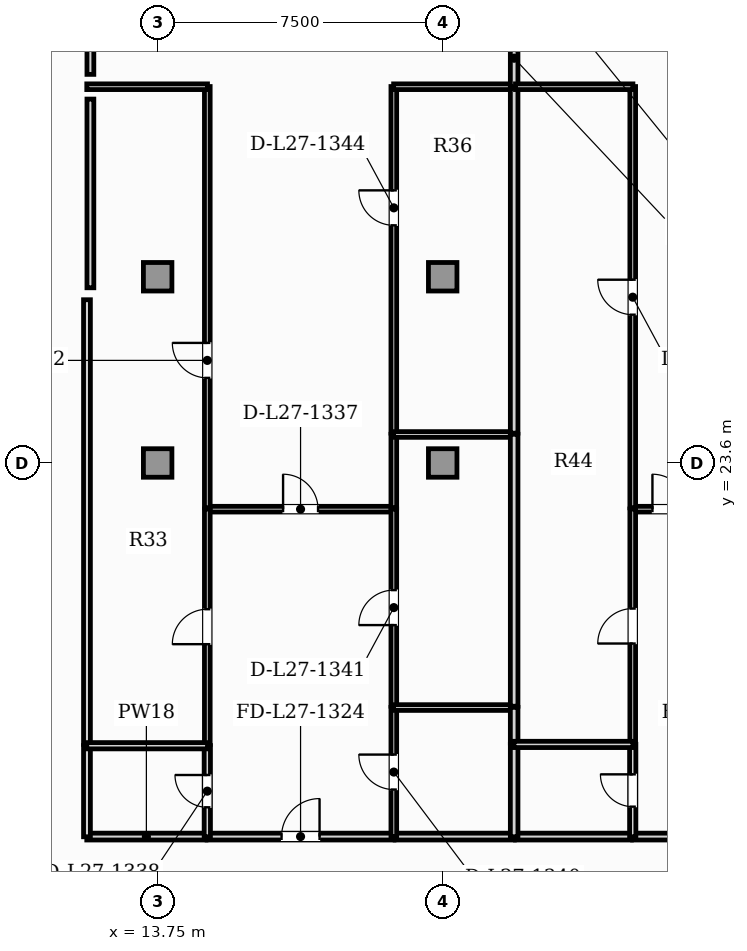
"""IFC4 building model, lengths in metres.
Left out: names, types, materials, properties, quantities, classifications, styles, units other than length and angle.
Written with IfcOpenShell. Run it as: python <this file> out.ifc"""

import sys

from ifc_helpers import new_model, si_unit, direction, frame, frame_2d, origin, origin_2d, place, context, subcontext, project, spatial, rectangle, extrude, element, fill, save


model = new_model("IFC4")
c1 = context("Model", 3, precision=1e-05, world=origin(), true_north=direction((0.0, 1.0)))
c2 = subcontext(c1, "Body", "Model", "MODEL_VIEW")
j1 = project(units=[si_unit("LENGTHUNIT", "METRE"), si_unit("PLANEANGLEUNIT", "RADIAN")], contexts=[c1])
p1 = place(None, origin())
s1 = spatial("IfcSite", under=j1, at=p1, CompositionType="ELEMENT")
p2 = place(p1, origin())
s2 = spatial("IfcBuilding", under=s1, at=p2, CompositionType="ELEMENT")
p3 = place(p2, frame((0.0, 0.0, 111.85)))
s3 = spatial("IfcBuildingStorey", under=s2, at=p3, CompositionType="ELEMENT", Elevation=111.85)
for number, where, z_axis, x_axis in (
    (1, (13.75, 23.6, 0.0), (0.0, 0.0, 1.0), (1.0, 0.0, 0.0)),
    (2, (21.25, 23.6, 0.0), (0.0, 0.0, 1.0), (1.0, 0.0, 0.0)),
    (3, (13.75, 28.5, 0.0), (0.0, 0.0, 1.0), (1.0, 0.0, 0.0)),
    (4, (21.25, 28.5, 0.0), (0.0, 0.0, 1.0), (1.0, 0.0, 0.0)),
):
    element("IfcColumn", number, at=place(p3, frame(where, z_axis=z_axis, x_axis=x_axis)), inside=s3, PredefinedType="COLUMN", context=c2, shape_type="SweptSolid", body=[
        extrude(rectangle(XDim=0.75, YDim=0.75, at=origin_2d()), origin(), (0.0, 0.0, 1.0), 3.85),
    ])
p4 = place(p3, frame((15.051, 13.77, 0.0), z_axis=(0.0, 0.0, 1.0), x_axis=(1.0, 0.0, 0.0)))
e5 = element("IfcWall", 5, at=p4, inside=s3, PredefinedType="PARTITIONING", context=c2, shape_type="SweptSolid", body=[
    extrude(rectangle(XDim=4.917, YDim=0.18, at=frame_2d((2.459, 0.0))), origin(), (0.0, 0.0, 1.0), 3.6),
])
p5 = place(p4, frame((1.959, 0.0, 0.0)))
e6 = element("IfcOpeningElement", 6, at=p5, cuts=e5, PredefinedType="OPENING", context=c2, shape_type="SweptSolid", body=[
    extrude(rectangle(XDim=1.0, YDim=2.15, at=frame_2d((0.5, 1.075))), frame((0.0, 0.1, 0.0), z_axis=(0.0, -1.0, 0.0), x_axis=(1.0, 0.0, 0.0)), (0.0, 0.0, 1.0), 0.2),
])
p6 = place(p3, frame((11.885, 13.77, 0.0), z_axis=(0.0, 0.0, 1.0), x_axis=(1.0, 0.0, 0.0)))
e7 = element("IfcWall", 7, at=p6, inside=s3, PredefinedType="PARTITIONING", context=c2, shape_type="SweptSolid", body=[
    extrude(rectangle(XDim=3.136, YDim=0.18, at=frame_2d((1.568, 0.0))), origin(), (0.0, 0.0, 1.0), 3.6),
])
p7 = place(p3, frame((11.89, 13.765, 0.0), z_axis=(0.0, 0.0, 1.0), x_axis=(0.0, 1.0, 0.0)))
e8 = element("IfcWall", 8, at=p7, inside=s3, PredefinedType="PARTITIONING", context=c2, shape_type="SweptSolid", body=[
    extrude(rectangle(XDim=2.4, YDim=0.18, at=frame_2d((1.2, 0.0))), origin(), (0.0, 0.0, 1.0), 3.6),
])
p8 = place(p3, frame((11.89, 16.195, 0.0), z_axis=(0.0, 0.0, 1.0), x_axis=(0.0, 1.0, 0.0)))
e9 = element("IfcWall", 9, at=p8, inside=s3, PredefinedType="PARTITIONING", context=c2, shape_type="SweptSolid", body=[
    extrude(rectangle(XDim=11.7, YDim=0.18, at=frame_2d((5.85, 0.0))), origin(), (0.0, 0.0, 1.0), 3.6),
])
p9 = place(p3, frame((19.999, 13.77, 0.0), z_axis=(0.0, 0.0, 1.0), x_axis=(1.0, 0.0, 0.0)))
e10 = element("IfcWall", 10, at=p9, inside=s3, PredefinedType="PARTITIONING", context=c2, shape_type="SweptSolid", body=[
    extrude(rectangle(XDim=3.136, YDim=0.18, at=frame_2d((1.568, 0.0))), origin(), (0.0, 0.0, 1.0), 3.6),
])
p10 = place(p3, frame((26.245, 13.77, 0.0), z_axis=(0.0, 0.0, 1.0), x_axis=(1.0, 0.0, 0.0)))
e11 = element("IfcWall", 11, at=p10, inside=s3, PredefinedType="PARTITIONING", context=c2, shape_type="SweptSolid", body=[
    extrude(rectangle(XDim=4.918, YDim=0.18, at=frame_2d((2.459, 0.0))), origin(), (0.0, 0.0, 1.0), 3.6),
])
p11 = place(p10, frame((1.959, 0.0, 0.0)))
e12 = element("IfcOpeningElement", 12, at=p11, cuts=e11, PredefinedType="OPENING", context=c2, shape_type="SweptSolid", body=[
    extrude(rectangle(XDim=1.0, YDim=2.15, at=frame_2d((0.5, 1.075))), frame((0.0, 0.1, 0.0), z_axis=(0.0, -1.0, 0.0), x_axis=(1.0, 0.0, 0.0)), (0.0, 0.0, 1.0), 0.2),
])
p12 = place(p3, frame((23.165, 13.77, 0.0), z_axis=(0.0, 0.0, 1.0), x_axis=(1.0, 0.0, 0.0)))
e13 = element("IfcWall", 13, at=p12, inside=s3, PredefinedType="PARTITIONING", context=c2, shape_type="SweptSolid", body=[
    extrude(rectangle(XDim=3.05, YDim=0.18, at=frame_2d((1.525, 0.0))), origin(), (0.0, 0.0, 1.0), 3.6),
])
p13 = place(p3, frame((15.051, 22.385, 0.0), z_axis=(0.0, 0.0, 1.0), x_axis=(1.0, 0.0, 0.0)))
e14 = element("IfcWall", 14, at=p13, inside=s3, PredefinedType="PARTITIONING", context=c2, shape_type="SweptSolid", body=[
    extrude(rectangle(XDim=4.917, YDim=0.15, at=frame_2d((2.459, 0.0))), origin(), (0.0, 0.0, 1.0), 3.6),
])
p14 = place(p13, frame((1.999, 0.0, 0.0)))
e15 = element("IfcOpeningElement", 15, at=p14, cuts=e14, PredefinedType="OPENING", context=c2, shape_type="SweptSolid", body=[
    extrude(rectangle(XDim=0.92, YDim=2.1, at=frame_2d((0.46, 1.05))), frame((0.0, 0.085, 0.0), z_axis=(0.0, -1.0, 0.0), x_axis=(1.0, 0.0, 0.0)), (0.0, 0.0, 1.0), 0.17),
])
p15 = place(p3, frame((15.056, 13.765, 0.0), z_axis=(0.0, 0.0, 1.0), x_axis=(0.0, 1.0, 0.0)))
e16 = element("IfcWall", 16, at=p15, inside=s3, PredefinedType="PLUMBINGWALL", context=c2, shape_type="SweptSolid", body=[
    extrude(rectangle(XDim=2.4, YDim=0.165, at=frame_2d((1.2, 0.0))), origin(), (0.0, 0.0, 1.0), 3.6),
])
p16 = place(p15, frame((0.775, 0.0, 0.0)))
e17 = element("IfcOpeningElement", 17, at=p16, cuts=e16, PredefinedType="OPENING", context=c2, shape_type="SweptSolid", body=[
    extrude(rectangle(XDim=0.85, YDim=2.1, at=frame_2d((0.425, 1.05))), frame((0.0, 0.093, 0.0), z_axis=(0.0, -1.0, 0.0), x_axis=(1.0, 0.0, 0.0)), (0.0, 0.0, 1.0), 0.185),
])
p17 = place(p3, frame((15.056, 16.195, 0.0), z_axis=(0.0, 0.0, 1.0), x_axis=(0.0, 1.0, 0.0)))
e18 = element("IfcWall", 18, at=p17, inside=s3, PredefinedType="PARTITIONING", context=c2, shape_type="SweptSolid", body=[
    extrude(rectangle(XDim=6.194, YDim=0.15, at=frame_2d((3.097, 0.0))), origin(), (0.0, 0.0, 1.0), 3.6),
])
p18 = place(p17, frame((2.637, 0.0, 0.0)))
e19 = element("IfcOpeningElement", 19, at=p18, cuts=e18, PredefinedType="OPENING", context=c2, shape_type="SweptSolid", body=[
    extrude(rectangle(XDim=0.92, YDim=2.1, at=frame_2d((0.46, 1.05))), frame((0.0, 0.085, 0.0), z_axis=(0.0, -1.0, 0.0), x_axis=(1.0, 0.0, 0.0)), (0.0, 0.0, 1.0), 0.17),
])
p19 = place(p3, frame((19.964, 13.765, 0.0), z_axis=(0.0, 0.0, 1.0), x_axis=(0.0, 1.0, 0.0)))
e20 = element("IfcWall", 20, at=p19, inside=s3, PredefinedType="PARTITIONING", context=c2, shape_type="SweptSolid", body=[
    extrude(rectangle(XDim=3.405, YDim=0.15, at=frame_2d((1.703, 0.0))), origin(), (0.0, 0.0, 1.0), 3.6),
])
p20 = place(p19, frame((1.242, 0.0, 0.0)))
e21 = element("IfcOpeningElement", 21, at=p20, cuts=e20, PredefinedType="OPENING", context=c2, shape_type="SweptSolid", body=[
    extrude(rectangle(XDim=0.92, YDim=2.1, at=frame_2d((0.46, 1.05))), frame((0.0, 0.085, 0.0), z_axis=(0.0, -1.0, 0.0), x_axis=(1.0, 0.0, 0.0)), (0.0, 0.0, 1.0), 0.17),
])
p21 = place(p3, frame((19.964, 17.2, 0.0), z_axis=(0.0, 0.0, 1.0), x_axis=(0.0, 1.0, 0.0)))
e22 = element("IfcWall", 22, at=p21, inside=s3, PredefinedType="PARTITIONING", context=c2, shape_type="SweptSolid", body=[
    extrude(rectangle(XDim=5.19, YDim=0.15, at=frame_2d((2.595, 0.0))), origin(), (0.0, 0.0, 1.0), 3.6),
])
p22 = place(p21, frame((2.135, 0.0, 0.0)))
e23 = element("IfcOpeningElement", 23, at=p22, cuts=e22, PredefinedType="OPENING", context=c2, shape_type="SweptSolid", body=[
    extrude(rectangle(XDim=0.92, YDim=2.1, at=frame_2d((0.46, 1.05))), frame((0.0, 0.085, 0.0), z_axis=(0.0, -1.0, 0.0), x_axis=(1.0, 0.0, 0.0)), (0.0, 0.0, 1.0), 0.17),
])
p23 = place(p3, frame((15.056, 22.419, 0.0), z_axis=(0.0, 0.0, 1.0), x_axis=(0.0, 1.0, 0.0)))
e24 = element("IfcWall", 24, at=p23, inside=s3, PredefinedType="PARTITIONING", context=c2, shape_type="SweptSolid", body=[
    extrude(rectangle(XDim=11.085, YDim=0.15, at=frame_2d((5.543, 0.0))), origin(), (0.0, 0.0, 1.0), 3.6),
])
p24 = place(p23, frame((3.42, 0.0, 0.0)))
e25 = element("IfcOpeningElement", 25, at=p24, cuts=e24, PredefinedType="OPENING", context=c2, shape_type="SweptSolid", body=[
    extrude(rectangle(XDim=0.92, YDim=2.1, at=frame_2d((0.46, 1.05))), frame((0.0, 0.085, 0.0), z_axis=(0.0, -1.0, 0.0), x_axis=(1.0, 0.0, 0.0)), (0.0, 0.0, 1.0), 0.17),
])
p25 = place(p3, frame((11.885, 33.5, 0.0), z_axis=(0.0, 0.0, 1.0), x_axis=(1.0, 0.0, 0.0)))
e26 = element("IfcWall", 26, at=p25, inside=s3, PredefinedType="PARTITIONING", context=c2, shape_type="SweptSolid", body=[
    extrude(rectangle(XDim=3.176, YDim=0.15, at=frame_2d((1.588, 0.0))), origin(), (0.0, 0.0, 1.0), 3.6),
])
p26 = place(p3, frame((19.964, 22.419, 0.0), z_axis=(0.0, 0.0, 1.0), x_axis=(0.0, 1.0, 0.0)))
e27 = element("IfcWall", 27, at=p26, inside=s3, PredefinedType="PARTITIONING", context=c2, shape_type="SweptSolid", body=[
    extrude(rectangle(XDim=1.936, YDim=0.15, at=frame_2d((0.968, 0.0))), origin(), (0.0, 0.0, 1.0), 3.6),
])
p27 = place(p3, frame((19.964, 24.385, 0.0), z_axis=(0.0, 0.0, 1.0), x_axis=(0.0, 1.0, 0.0)))
e28 = element("IfcWall", 28, at=p27, inside=s3, PredefinedType="PARTITIONING", context=c2, shape_type="SweptSolid", body=[
    extrude(rectangle(XDim=9.12, YDim=0.15, at=frame_2d((4.56, 0.0))), origin(), (0.0, 0.0, 1.0), 3.6),
])
p28 = place(p27, frame((5.468, 0.0, 0.0)))
e29 = element("IfcOpeningElement", 29, at=p28, cuts=e28, PredefinedType="OPENING", context=c2, shape_type="SweptSolid", body=[
    extrude(rectangle(XDim=0.92, YDim=2.1, at=frame_2d((0.46, 1.05))), frame((0.0, 0.085, 0.0), z_axis=(0.0, -1.0, 0.0), x_axis=(1.0, 0.0, 0.0)), (0.0, 0.0, 1.0), 0.17),
])
p29 = place(p3, frame((19.959, 33.5, 0.0), z_axis=(0.0, 0.0, 1.0), x_axis=(1.0, 0.0, 0.0)))
e30 = element("IfcWall", 30, at=p29, inside=s3, PredefinedType="PARTITIONING", context=c2, shape_type="SweptSolid", body=[
    extrude(rectangle(XDim=3.176, YDim=0.15, at=frame_2d((1.588, 0.0))), origin(), (0.0, 0.0, 1.0), 3.6),
])
p30 = place(p3, frame((23.13, 33.495, 0.0), z_axis=(0.0, 0.0, 1.0), x_axis=(0.0, 1.0, 0.0)))
e31 = element("IfcWall", 31, at=p30, inside=s3, PredefinedType="PARTITIONING", context=c2, shape_type="SweptSolid", body=[
    extrude(rectangle(XDim=1.51, YDim=0.2, at=frame_2d((0.755, 0.0))), origin(), (0.0, 0.0, 1.0), 3.6),
])
p31 = place(p3, frame((11.885, 16.16, 0.0), z_axis=(0.0, 0.0, 1.0), x_axis=(1.0, 0.0, 0.0)))
e32 = element("IfcWall", 32, at=p31, inside=s3, PredefinedType="PLUMBINGWALL", context=c2, shape_type="SweptSolid", body=[
    extrude(rectangle(XDim=3.176, YDim=0.165, at=frame_2d((1.588, 0.0))), origin(), (0.0, 0.0, 1.0), 3.6),
])
p32 = place(p3, frame((19.959, 17.165, 0.0), z_axis=(0.0, 0.0, 1.0), x_axis=(1.0, 0.0, 0.0)))
e33 = element("IfcWall", 33, at=p32, inside=s3, PredefinedType="PARTITIONING", context=c2, shape_type="SweptSolid", body=[
    extrude(rectangle(XDim=3.176, YDim=0.15, at=frame_2d((1.588, 0.0))), origin(), (0.0, 0.0, 1.0), 3.6),
])
p33 = place(p3, frame((23.13, 13.765, 0.0), z_axis=(0.0, 0.0, 1.0), x_axis=(0.0, 1.0, 0.0)))
e34 = element("IfcWall", 34, at=p33, inside=s3, PredefinedType="PARTITIONING", context=c2, shape_type="SweptSolid", body=[
    extrude(rectangle(XDim=2.435, YDim=0.2, at=frame_2d((1.217, 0.0))), origin(), (0.0, 0.0, 1.0), 3.6),
])
p34 = place(p3, frame((23.13, 16.23, 0.0), z_axis=(0.0, 0.0, 1.0), x_axis=(0.0, 1.0, 0.0)))
e35 = element("IfcWall", 35, at=p34, inside=s3, PredefinedType="PARTITIONING", context=c2, shape_type="SweptSolid", body=[
    extrude(rectangle(XDim=0.94, YDim=0.2, at=frame_2d((0.47, 0.0))), origin(), (0.0, 0.0, 1.0), 3.6),
])
p35 = place(p3, frame((19.959, 24.35, 0.0), z_axis=(0.0, 0.0, 1.0), x_axis=(1.0, 0.0, 0.0)))
e36 = element("IfcWall", 36, at=p35, inside=s3, PredefinedType="PARTITIONING", context=c2, shape_type="SweptSolid", body=[
    extrude(rectangle(XDim=3.176, YDim=0.15, at=frame_2d((1.588, 0.0))), origin(), (0.0, 0.0, 1.0), 3.6),
])
p36 = place(p3, frame((23.13, 17.2, 0.0), z_axis=(0.0, 0.0, 1.0), x_axis=(0.0, 1.0, 0.0)))
e37 = element("IfcWall", 37, at=p36, inside=s3, PredefinedType="PARTITIONING", context=c2, shape_type="SweptSolid", body=[
    extrude(rectangle(XDim=7.155, YDim=0.2, at=frame_2d((3.578, 0.0))), origin(), (0.0, 0.0, 1.0), 3.6),
])
p37 = place(p3, frame((23.13, 24.385, 0.0), z_axis=(0.0, 0.0, 1.0), x_axis=(0.0, 1.0, 0.0)))
e38 = element("IfcWall", 38, at=p37, inside=s3, PredefinedType="PARTITIONING", context=c2, shape_type="SweptSolid", body=[
    extrude(rectangle(XDim=9.08, YDim=0.2, at=frame_2d((4.54, 0.0))), origin(), (0.0, 0.0, 1.0), 3.6),
])
p38 = place(p3, frame((26.245, 22.385, 0.0), z_axis=(0.0, 0.0, 1.0), x_axis=(1.0, 0.0, 0.0)))
e39 = element("IfcWall", 39, at=p38, inside=s3, PredefinedType="PARTITIONING", context=c2, shape_type="SweptSolid", body=[
    extrude(rectangle(XDim=4.918, YDim=0.15, at=frame_2d((2.459, 0.0))), origin(), (0.0, 0.0, 1.0), 3.6),
])
p39 = place(p38, frame((0.523, 0.0, 0.0)))
e40 = element("IfcOpeningElement", 40, at=p39, cuts=e39, PredefinedType="OPENING", context=c2, shape_type="SweptSolid", body=[
    extrude(rectangle(XDim=0.92, YDim=2.1, at=frame_2d((0.46, 1.05))), frame((0.0, 0.085, 0.0), z_axis=(0.0, -1.0, 0.0), x_axis=(1.0, 0.0, 0.0)), (0.0, 0.0, 1.0), 0.17),
])
p40 = place(p3, frame((26.25, 13.765, 0.0), z_axis=(0.0, 0.0, 1.0), x_axis=(0.0, 1.0, 0.0)))
e41 = element("IfcWall", 41, at=p40, inside=s3, PredefinedType="PLUMBINGWALL", context=c2, shape_type="SweptSolid", body=[
    extrude(rectangle(XDim=2.435, YDim=0.165, at=frame_2d((1.217, 0.0))), origin(), (0.0, 0.0, 1.0), 3.6),
])
p41 = place(p40, frame((0.792, 0.0, 0.0)))
e42 = element("IfcOpeningElement", 42, at=p41, cuts=e41, PredefinedType="OPENING", context=c2, shape_type="SweptSolid", body=[
    extrude(rectangle(XDim=0.85, YDim=2.1, at=frame_2d((0.425, 1.05))), frame((0.0, 0.093, 0.0), z_axis=(0.0, -1.0, 0.0), x_axis=(1.0, 0.0, 0.0)), (0.0, 0.0, 1.0), 0.185),
])
p42 = place(p3, frame((26.25, 16.23, 0.0), z_axis=(0.0, 0.0, 1.0), x_axis=(0.0, 1.0, 0.0)))
e43 = element("IfcWall", 43, at=p42, inside=s3, PredefinedType="PARTITIONING", context=c2, shape_type="SweptSolid", body=[
    extrude(rectangle(XDim=6.16, YDim=0.15, at=frame_2d((3.08, 0.0))), origin(), (0.0, 0.0, 1.0), 3.6),
])
p43 = place(p42, frame((2.62, 0.0, 0.0)))
e44 = element("IfcOpeningElement", 44, at=p43, cuts=e43, PredefinedType="OPENING", context=c2, shape_type="SweptSolid", body=[
    extrude(rectangle(XDim=0.92, YDim=2.1, at=frame_2d((0.46, 1.05))), frame((0.0, 0.085, 0.0), z_axis=(0.0, -1.0, 0.0), x_axis=(1.0, 0.0, 0.0)), (0.0, 0.0, 1.0), 0.17),
])
p44 = place(p3, frame((26.25, 22.419, 0.0), z_axis=(0.0, 0.0, 1.0), x_axis=(0.0, 1.0, 0.0)))
e45 = element("IfcWall", 45, at=p44, inside=s3, PredefinedType="PARTITIONING", context=c2, shape_type="SweptSolid", body=[
    extrude(rectangle(XDim=11.085, YDim=0.15, at=frame_2d((5.543, 0.0))), origin(), (0.0, 0.0, 1.0), 3.6),
])
p45 = place(p44, frame((5.083, 0.0, 0.0)))
e46 = element("IfcOpeningElement", 46, at=p45, cuts=e45, PredefinedType="OPENING", context=c2, shape_type="SweptSolid", body=[
    extrude(rectangle(XDim=0.92, YDim=2.1, at=frame_2d((0.46, 1.05))), frame((0.0, 0.085, 0.0), z_axis=(0.0, -1.0, 0.0), x_axis=(1.0, 0.0, 0.0)), (0.0, 0.0, 1.0), 0.17),
])
p46 = place(p3, frame((23.165, 33.5, 0.0), z_axis=(0.0, 0.0, 1.0), x_axis=(1.0, 0.0, 0.0)))
e47 = element("IfcWall", 47, at=p46, inside=s3, PredefinedType="PARTITIONING", context=c2, shape_type="SweptSolid", body=[
    extrude(rectangle(XDim=3.09, YDim=0.15, at=frame_2d((1.545, 0.0))), origin(), (0.0, 0.0, 1.0), 3.6),
])
p47 = place(p3, frame((23.125, 16.195, 0.0), z_axis=(0.0, 0.0, 1.0), x_axis=(1.0, 0.0, 0.0)))
e48 = element("IfcWall", 48, at=p47, inside=s3, PredefinedType="PLUMBINGWALL", context=c2, shape_type="SweptSolid", body=[
    extrude(rectangle(XDim=3.13, YDim=0.165, at=frame_2d((1.565, 0.0))), origin(), (0.0, 0.0, 1.0), 3.6),
])
p48 = place(p3, frame((11.98, 33.825, 0.0), z_axis=(0.0, 0.0, 1.0), x_axis=(0.0, 1.0, 0.0)))
e49 = element("IfcWall", 49, at=p48, inside=s3, PredefinedType="PARTITIONING", context=c2, shape_type="SweptSolid", body=[
    extrude(rectangle(XDim=0.85, YDim=0.18, at=frame_2d((0.425, 0.0))), origin(), (0.0, 0.0, 1.0), 3.6),
])
p49 = place(p3, frame((11.98, 28.21, 0.0), z_axis=(0.0, 0.0, 1.0), x_axis=(0.0, 1.0, 0.0)))
e50 = element("IfcWall", 50, at=p49, inside=s3, PredefinedType="PARTITIONING", context=c2, shape_type="SweptSolid", body=[
    extrude(rectangle(XDim=4.965, YDim=0.18, at=frame_2d((2.482, 0.0))), origin(), (0.0, 0.0, 1.0), 3.6),
])
p50 = place(p5, origin())
e51 = element("IfcDoor", 51, at=p50, inside=s3, OperationType="SINGLE_SWING_RIGHT", PredefinedType="DOOR", context=c2, shape_type="SweptSolid", body=[
    extrude(rectangle(XDim=1.0, YDim=2.15, at=frame_2d((0.5, 1.075))), frame((0.0, 0.025, 0.0), z_axis=(0.0, -1.0, 0.0), x_axis=(1.0, 0.0, 0.0)), (0.0, 0.0, 1.0), 0.05),
])
fill(e6, e51)
p51 = place(p14, origin())
e52 = element("IfcDoor", 52, at=p51, inside=s3, OperationType="SINGLE_SWING_LEFT", PredefinedType="DOOR", context=c2, shape_type="SweptSolid", body=[
    extrude(rectangle(XDim=0.92, YDim=2.1, at=frame_2d((0.46, 1.05))), frame((0.0, 0.025, 0.0), z_axis=(0.0, -1.0, 0.0), x_axis=(1.0, 0.0, 0.0)), (0.0, 0.0, 1.0), 0.05),
])
fill(e15, e52)
p52 = place(p16, origin())
e53 = element("IfcDoor", 53, at=p52, inside=s3, OperationType="SINGLE_SWING_RIGHT", PredefinedType="DOOR", context=c2, shape_type="SweptSolid", body=[
    extrude(rectangle(XDim=0.85, YDim=2.1, at=frame_2d((0.425, 1.05))), frame((0.0, 0.025, 0.0), z_axis=(0.0, -1.0, 0.0), x_axis=(1.0, 0.0, 0.0)), (0.0, 0.0, 1.0), 0.05),
])
fill(e17, e53)
p53 = place(p18, origin())
e54 = element("IfcDoor", 54, at=p53, inside=s3, OperationType="SINGLE_SWING_LEFT", PredefinedType="DOOR", context=c2, shape_type="SweptSolid", body=[
    extrude(rectangle(XDim=0.92, YDim=2.1, at=frame_2d((0.46, 1.05))), frame((0.0, 0.025, 0.0), z_axis=(0.0, -1.0, 0.0), x_axis=(1.0, 0.0, 0.0)), (0.0, 0.0, 1.0), 0.05),
])
fill(e19, e54)
p54 = place(p20, origin())
e55 = element("IfcDoor", 55, at=p54, inside=s3, OperationType="SINGLE_SWING_RIGHT", PredefinedType="DOOR", context=c2, shape_type="SweptSolid", body=[
    extrude(rectangle(XDim=0.92, YDim=2.1, at=frame_2d((0.46, 1.05))), frame((0.0, 0.025, 0.0), z_axis=(0.0, -1.0, 0.0), x_axis=(1.0, 0.0, 0.0)), (0.0, 0.0, 1.0), 0.05),
])
fill(e21, e55)
p55 = place(p22, origin())
e56 = element("IfcDoor", 56, at=p55, inside=s3, OperationType="SINGLE_SWING_LEFT", PredefinedType="DOOR", context=c2, shape_type="SweptSolid", body=[
    extrude(rectangle(XDim=0.92, YDim=2.1, at=frame_2d((0.46, 1.05))), frame((0.0, 0.025, 0.0), z_axis=(0.0, -1.0, 0.0), x_axis=(1.0, 0.0, 0.0)), (0.0, 0.0, 1.0), 0.05),
])
fill(e23, e56)
p56 = place(p24, origin())
e57 = element("IfcDoor", 57, at=p56, inside=s3, OperationType="SINGLE_SWING_RIGHT", PredefinedType="DOOR", context=c2, shape_type="SweptSolid", body=[
    extrude(rectangle(XDim=0.92, YDim=2.1, at=frame_2d((0.46, 1.05))), frame((0.0, 0.025, 0.0), z_axis=(0.0, -1.0, 0.0), x_axis=(1.0, 0.0, 0.0)), (0.0, 0.0, 1.0), 0.05),
])
fill(e25, e57)
p57 = place(p28, origin())
e58 = element("IfcDoor", 58, at=p57, inside=s3, OperationType="SINGLE_SWING_RIGHT", PredefinedType="DOOR", context=c2, shape_type="SweptSolid", body=[
    extrude(rectangle(XDim=0.92, YDim=2.1, at=frame_2d((0.46, 1.05))), frame((0.0, 0.025, 0.0), z_axis=(0.0, -1.0, 0.0), x_axis=(1.0, 0.0, 0.0)), (0.0, 0.0, 1.0), 0.05),
])
fill(e29, e58)
p58 = place(p39, origin())
e59 = element("IfcDoor", 59, at=p58, inside=s3, OperationType="SINGLE_SWING_LEFT", PredefinedType="DOOR", context=c2, shape_type="SweptSolid", body=[
    extrude(rectangle(XDim=0.92, YDim=2.1, at=frame_2d((0.46, 1.05))), frame((0.0, 0.025, 0.0), z_axis=(0.0, -1.0, 0.0), x_axis=(1.0, 0.0, 0.0)), (0.0, 0.0, 1.0), 0.05),
])
fill(e40, e59)
p59 = place(p41, origin())
e60 = element("IfcDoor", 60, at=p59, inside=s3, OperationType="SINGLE_SWING_RIGHT", PredefinedType="DOOR", context=c2, shape_type="SweptSolid", body=[
    extrude(rectangle(XDim=0.85, YDim=2.1, at=frame_2d((0.425, 1.05))), frame((0.0, 0.025, 0.0), z_axis=(0.0, -1.0, 0.0), x_axis=(1.0, 0.0, 0.0)), (0.0, 0.0, 1.0), 0.05),
])
fill(e42, e60)
p60 = place(p43, origin())
e61 = element("IfcDoor", 61, at=p60, inside=s3, OperationType="SINGLE_SWING_LEFT", PredefinedType="DOOR", context=c2, shape_type="SweptSolid", body=[
    extrude(rectangle(XDim=0.92, YDim=2.1, at=frame_2d((0.46, 1.05))), frame((0.0, 0.025, 0.0), z_axis=(0.0, -1.0, 0.0), x_axis=(1.0, 0.0, 0.0)), (0.0, 0.0, 1.0), 0.05),
])
fill(e44, e61)
p61 = place(p45, origin())
e62 = element("IfcDoor", 62, at=p61, inside=s3, OperationType="SINGLE_SWING_RIGHT", PredefinedType="DOOR", context=c2, shape_type="SweptSolid", body=[
    extrude(rectangle(XDim=0.92, YDim=2.1, at=frame_2d((0.46, 1.05))), frame((0.0, 0.025, 0.0), z_axis=(0.0, -1.0, 0.0), x_axis=(1.0, 0.0, 0.0)), (0.0, 0.0, 1.0), 0.05),
])
fill(e46, e62)
save(model, sys.argv[1])
